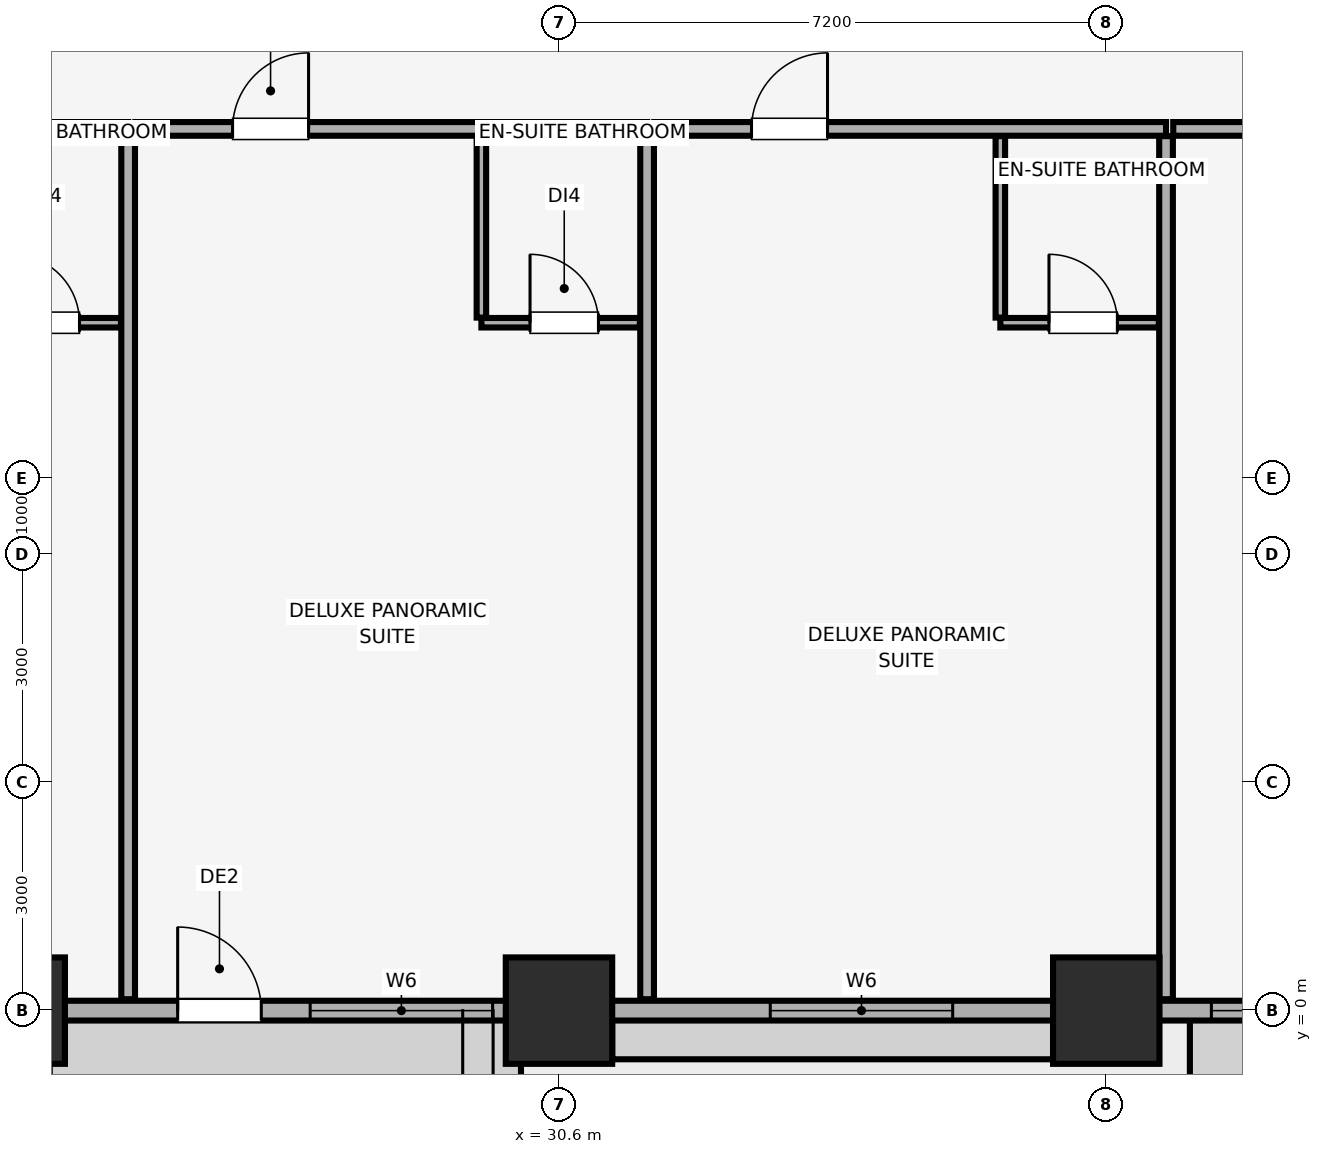
"""IFC4 building model, lengths in metres.
Left out: names, types, materials, properties, quantities, classifications, styles, units other than length and angle.
Written with IfcOpenShell. Run it as: python <this file> out.ifc"""

import sys

from ifc_helpers import new_model, si_unit, direction, frame, frame_2d, origin, origin_2d, place, context, subcontext, project, spatial, rectangle, extrude, element, fill, save


model = new_model("IFC4")
c1 = context("Model", 3, precision=1e-05, world=origin(), true_north=direction((0.0, 1.0)))
c2 = subcontext(c1, "Body", "Model", "MODEL_VIEW")
j1 = project(units=[si_unit("LENGTHUNIT", "METRE"), si_unit("PLANEANGLEUNIT", "RADIAN")], contexts=[c1])
p1 = place(None, origin())
s1 = spatial("IfcSite", under=j1, at=p1, CompositionType="ELEMENT")
p2 = place(p1, origin())
s2 = spatial("IfcBuilding", under=s1, at=p2, CompositionType="ELEMENT")
p3 = place(p2, frame((0.0, 0.0, 57.65)))
s3 = spatial("IfcBuildingStorey", under=s2, at=p3, CompositionType="ELEMENT", Elevation=57.65)
for number, where, z_axis, x_axis in (
    (1, (23.4, 0.0, 0.0), (0.0, 0.0, 1.0), (1.0, 0.0, 0.0)),
    (2, (30.6, 0.0, 0.0), (0.0, 0.0, 1.0), (1.0, 0.0, 0.0)),
    (3, (37.8, 0.0, 0.0), (0.0, 0.0, 1.0), (1.0, 0.0, 0.0)),
):
    element("IfcColumn", number, at=place(p3, frame(where, z_axis=z_axis, x_axis=x_axis)), inside=s3, PredefinedType="COLUMN", context=c2, shape_type="SweptSolid", body=[
        extrude(rectangle(XDim=1.4, YDim=1.4, at=origin_2d()), origin(), (0.0, 0.0, 1.0), 3.51),
    ])
p4 = place(p3, frame((4.2, 0.0, 0.0), z_axis=(0.0, 0.0, 1.0), x_axis=(1.0, 0.0, 0.0)))
e4 = element("IfcWall", 4, at=p4, inside=s3, PredefinedType="SOLIDWALL", context=c2, shape_type="SweptSolid", body=[
    extrude(rectangle(XDim=75.6, YDim=0.26, at=frame_2d((37.8, 0.0))), origin(), (0.0, 0.0, 1.0), 2.56),
])
p5 = place(p4, frame((21.383, 0.0, 0.0)))
e5 = element("IfcOpeningElement", 5, at=p5, cuts=e4, PredefinedType="OPENING", context=c2, shape_type="SweptSolid", body=[
    extrude(rectangle(XDim=1.1, YDim=2.15, at=frame_2d((0.55, 1.075))), frame((0.0, 0.14, 0.0), z_axis=(0.0, -1.0, 0.0), x_axis=(1.0, 0.0, 0.0)), (0.0, 0.0, 1.0), 0.28),
])
p6 = place(p4, frame((37.25, 0.0, 0.0)))
e6 = element("IfcOpeningElement", 6, at=p6, cuts=e4, PredefinedType="OPENING", context=c2, shape_type="SweptSolid", body=[
    extrude(rectangle(XDim=1.1, YDim=2.15, at=frame_2d((0.55, 1.075))), frame((0.0, 0.14, 0.0), z_axis=(0.0, -1.0, 0.0), x_axis=(1.0, 0.0, 0.0)), (0.0, 0.0, 1.0), 0.28),
])
p7 = place(p4, frame((53.117, 0.0, 0.0)))
e7 = element("IfcOpeningElement", 7, at=p7, cuts=e4, PredefinedType="OPENING", context=c2, shape_type="SweptSolid", body=[
    extrude(rectangle(XDim=1.1, YDim=2.15, at=frame_2d((0.55, 1.075))), frame((0.0, 0.14, 0.0), z_axis=(0.0, -1.0, 0.0), x_axis=(1.0, 0.0, 0.0)), (0.0, 0.0, 1.0), 0.28),
])
p8 = place(p4, frame((1.035, 0.0, 0.85)))
e8 = element("IfcOpeningElement", 8, at=p8, cuts=e4, PredefinedType="OPENING", context=c2, shape_type="SweptSolid", body=[
    extrude(rectangle(XDim=2.4, YDim=1.5, at=frame_2d((1.2, 0.75))), frame((0.0, 0.14, 0.0), z_axis=(0.0, -1.0, 0.0), x_axis=(1.0, 0.0, 0.0)), (0.0, 0.0, 1.0), 0.28),
])
p9 = place(p4, frame((8.138, 0.0, 0.85)))
e9 = element("IfcOpeningElement", 9, at=p9, cuts=e4, PredefinedType="OPENING", context=c2, shape_type="SweptSolid", body=[
    extrude(rectangle(XDim=2.4, YDim=1.5, at=frame_2d((1.2, 0.75))), frame((0.0, 0.14, 0.0), z_axis=(0.0, -1.0, 0.0), x_axis=(1.0, 0.0, 0.0)), (0.0, 0.0, 1.0), 0.28),
])
p10 = place(p4, frame((15.153, 0.0, 0.85)))
e10 = element("IfcOpeningElement", 10, at=p10, cuts=e4, PredefinedType="OPENING", context=c2, shape_type="SweptSolid", body=[
    extrude(rectangle(XDim=2.4, YDim=1.5, at=frame_2d((1.2, 0.75))), frame((0.0, 0.14, 0.0), z_axis=(0.0, -1.0, 0.0), x_axis=(1.0, 0.0, 0.0)), (0.0, 0.0, 1.0), 0.28),
])
p11 = place(p4, frame((23.127, 0.0, 0.85)))
e11 = element("IfcOpeningElement", 11, at=p11, cuts=e4, PredefinedType="OPENING", context=c2, shape_type="SweptSolid", body=[
    extrude(rectangle(XDim=2.4, YDim=1.5, at=frame_2d((1.2, 0.75))), frame((0.0, 0.14, 0.0), z_axis=(0.0, -1.0, 0.0), x_axis=(1.0, 0.0, 0.0)), (0.0, 0.0, 1.0), 0.28),
])
p12 = place(p4, frame((29.179, 0.0, 0.85)))
e12 = element("IfcOpeningElement", 12, at=p12, cuts=e4, PredefinedType="OPENING", context=c2, shape_type="SweptSolid", body=[
    extrude(rectangle(XDim=2.4, YDim=1.5, at=frame_2d((1.2, 0.75))), frame((0.0, 0.14, 0.0), z_axis=(0.0, -1.0, 0.0), x_axis=(1.0, 0.0, 0.0)), (0.0, 0.0, 1.0), 0.28),
])
p13 = place(p4, frame((34.983, 0.0, 0.85)))
e13 = element("IfcOpeningElement", 13, at=p13, cuts=e4, PredefinedType="OPENING", context=c2, shape_type="SweptSolid", body=[
    extrude(rectangle(XDim=1.5, YDim=1.4, at=frame_2d((0.75, 0.7))), frame((0.0, 0.14, 0.0), z_axis=(0.0, -1.0, 0.0), x_axis=(1.0, 0.0, 0.0)), (0.0, 0.0, 1.0), 0.28),
])
p14 = place(p4, frame((39.117, 0.0, 0.85)))
e14 = element("IfcOpeningElement", 14, at=p14, cuts=e4, PredefinedType="OPENING", context=c2, shape_type="SweptSolid", body=[
    extrude(rectangle(XDim=1.5, YDim=1.4, at=frame_2d((0.75, 0.7))), frame((0.0, 0.14, 0.0), z_axis=(0.0, -1.0, 0.0), x_axis=(1.0, 0.0, 0.0)), (0.0, 0.0, 1.0), 0.28),
])
p15 = place(p4, frame((44.021, 0.0, 0.85)))
e15 = element("IfcOpeningElement", 15, at=p15, cuts=e4, PredefinedType="OPENING", context=c2, shape_type="SweptSolid", body=[
    extrude(rectangle(XDim=2.4, YDim=1.5, at=frame_2d((1.2, 0.75))), frame((0.0, 0.14, 0.0), z_axis=(0.0, -1.0, 0.0), x_axis=(1.0, 0.0, 0.0)), (0.0, 0.0, 1.0), 0.28),
])
p16 = place(p4, frame((50.073, 0.0, 0.85)))
e16 = element("IfcOpeningElement", 16, at=p16, cuts=e4, PredefinedType="OPENING", context=c2, shape_type="SweptSolid", body=[
    extrude(rectangle(XDim=2.4, YDim=1.5, at=frame_2d((1.2, 0.75))), frame((0.0, 0.14, 0.0), z_axis=(0.0, -1.0, 0.0), x_axis=(1.0, 0.0, 0.0)), (0.0, 0.0, 1.0), 0.28),
])
p17 = place(p4, frame((58.048, 0.0, 0.85)))
e17 = element("IfcOpeningElement", 17, at=p17, cuts=e4, PredefinedType="OPENING", context=c2, shape_type="SweptSolid", body=[
    extrude(rectangle(XDim=2.4, YDim=1.5, at=frame_2d((1.2, 0.75))), frame((0.0, 0.14, 0.0), z_axis=(0.0, -1.0, 0.0), x_axis=(1.0, 0.0, 0.0)), (0.0, 0.0, 1.0), 0.28),
])
p18 = place(p4, frame((65.062, 0.0, 0.85)))
e18 = element("IfcOpeningElement", 18, at=p18, cuts=e4, PredefinedType="OPENING", context=c2, shape_type="SweptSolid", body=[
    extrude(rectangle(XDim=2.4, YDim=1.5, at=frame_2d((1.2, 0.75))), frame((0.0, 0.14, 0.0), z_axis=(0.0, -1.0, 0.0), x_axis=(1.0, 0.0, 0.0)), (0.0, 0.0, 1.0), 0.28),
])
p19 = place(p4, frame((72.165, 0.0, 0.85)))
e19 = element("IfcOpeningElement", 19, at=p19, cuts=e4, PredefinedType="OPENING", context=c2, shape_type="SweptSolid", body=[
    extrude(rectangle(XDim=2.4, YDim=1.5, at=frame_2d((1.2, 0.75))), frame((0.0, 0.14, 0.0), z_axis=(0.0, -1.0, 0.0), x_axis=(1.0, 0.0, 0.0)), (0.0, 0.0, 1.0), 0.28),
])
p20 = place(p3, frame((18.199, 11.6, 0.0), z_axis=(0.0, 0.0, 1.0), x_axis=(1.0, 0.0, 0.0)))
e20 = element("IfcWall", 20, at=p20, inside=s3, PredefinedType="PARTITIONING", context=c2, shape_type="SweptSolid", body=[
    extrude(rectangle(XDim=6.732, YDim=0.18, at=frame_2d((3.366, 0.0))), origin(), (0.0, 0.0, 1.0), 3.51),
])
p21 = place(p20, frame((1.279, 0.0, 0.0)))
e21 = element("IfcOpeningElement", 21, at=p21, cuts=e20, PredefinedType="OPENING", context=c2, shape_type="SweptSolid", body=[
    extrude(rectangle(XDim=1.0, YDim=2.15, at=frame_2d((0.5, 1.075))), frame((0.0, 0.1, 0.0), z_axis=(0.0, -1.0, 0.0), x_axis=(1.0, 0.0, 0.0)), (0.0, 0.0, 1.0), 0.2),
])
p22 = place(p3, frame((24.932, 0.15, 0.0), z_axis=(0.0, 0.0, 1.0), x_axis=(0.0, 1.0, 0.0)))
e22 = element("IfcWall", 22, at=p22, inside=s3, PredefinedType="PARTITIONING", context=c2, shape_type="SweptSolid", body=[
    extrude(rectangle(XDim=11.355, YDim=0.18, at=frame_2d((5.677, 0.0))), origin(), (0.0, 0.0, 1.0), 3.51),
])
p23 = place(p3, frame((22.752, 9.05, 0.0), z_axis=(0.0, 0.0, 1.0), x_axis=(1.0, 0.0, 0.0)))
e23 = element("IfcWall", 23, at=p23, inside=s3, PredefinedType="PARTITIONING", context=c2, shape_type="SweptSolid", body=[
    extrude(rectangle(XDim=2.085, YDim=0.125, at=frame_2d((1.042, 0.0))), origin(), (0.0, 0.0, 1.0), 3.51),
])
p24 = place(p23, frame((0.64, 0.0, 0.0)))
e24 = element("IfcOpeningElement", 24, at=p24, cuts=e23, PredefinedType="OPENING", context=c2, shape_type="SweptSolid", body=[
    extrude(rectangle(XDim=0.9, YDim=2.1, at=frame_2d((0.45, 1.05))), frame((0.0, 0.073, 0.0), z_axis=(0.0, -1.0, 0.0), x_axis=(1.0, 0.0, 0.0)), (0.0, 0.0, 1.0), 0.145),
])
p25 = place(p3, frame((25.027, 11.6, 0.0), z_axis=(0.0, 0.0, 1.0), x_axis=(1.0, 0.0, 0.0)))
e25 = element("IfcWall", 25, at=p25, inside=s3, PredefinedType="PARTITIONING", context=c2, shape_type="SweptSolid", body=[
    extrude(rectangle(XDim=6.732, YDim=0.18, at=frame_2d((3.366, 0.0))), origin(), (0.0, 0.0, 1.0), 3.51),
])
p26 = place(p25, frame((1.279, 0.0, 0.0)))
e26 = element("IfcOpeningElement", 26, at=p26, cuts=e25, PredefinedType="OPENING", context=c2, shape_type="SweptSolid", body=[
    extrude(rectangle(XDim=1.0, YDim=2.15, at=frame_2d((0.5, 1.075))), frame((0.0, 0.1, 0.0), z_axis=(0.0, -1.0, 0.0), x_axis=(1.0, 0.0, 0.0)), (0.0, 0.0, 1.0), 0.2),
])
p27 = place(p3, frame((31.759, 0.15, 0.0), z_axis=(0.0, 0.0, 1.0), x_axis=(0.0, 1.0, 0.0)))
e27 = element("IfcWall", 27, at=p27, inside=s3, PredefinedType="PARTITIONING", context=c2, shape_type="SweptSolid", body=[
    extrude(rectangle(XDim=11.355, YDim=0.18, at=frame_2d((5.677, 0.0))), origin(), (0.0, 0.0, 1.0), 3.51),
])
p28 = place(p3, frame((29.579, 9.05, 0.0), z_axis=(0.0, 0.0, 1.0), x_axis=(1.0, 0.0, 0.0)))
e28 = element("IfcWall", 28, at=p28, inside=s3, PredefinedType="PARTITIONING", context=c2, shape_type="SweptSolid", body=[
    extrude(rectangle(XDim=2.085, YDim=0.125, at=frame_2d((1.042, 0.0))), origin(), (0.0, 0.0, 1.0), 3.51),
])
p29 = place(p28, frame((0.64, 0.0, 0.0)))
e29 = element("IfcOpeningElement", 29, at=p29, cuts=e28, PredefinedType="OPENING", context=c2, shape_type="SweptSolid", body=[
    extrude(rectangle(XDim=0.9, YDim=2.1, at=frame_2d((0.45, 1.05))), frame((0.0, 0.073, 0.0), z_axis=(0.0, -1.0, 0.0), x_axis=(1.0, 0.0, 0.0)), (0.0, 0.0, 1.0), 0.145),
])
p30 = place(p3, frame((29.579, 9.117, 0.0), z_axis=(0.0, 0.0, 1.0), x_axis=(0.0, 1.0, 0.0)))
e30 = element("IfcWall", 30, at=p30, inside=s3, PredefinedType="PARTITIONING", context=c2, shape_type="SweptSolid", body=[
    extrude(rectangle(XDim=2.387, YDim=0.125, at=frame_2d((1.194, 0.0))), origin(), (0.0, 0.0, 1.0), 3.51),
])
p31 = place(p3, frame((31.854, 11.6, 0.0), z_axis=(0.0, 0.0, 1.0), x_axis=(1.0, 0.0, 0.0)))
e31 = element("IfcWall", 31, at=p31, inside=s3, PredefinedType="PARTITIONING", context=c2, shape_type="SweptSolid", body=[
    extrude(rectangle(XDim=6.732, YDim=0.18, at=frame_2d((3.366, 0.0))), origin(), (0.0, 0.0, 1.0), 3.51),
])
p32 = place(p31, frame((1.279, 0.0, 0.0)))
e32 = element("IfcOpeningElement", 32, at=p32, cuts=e31, PredefinedType="OPENING", context=c2, shape_type="SweptSolid", body=[
    extrude(rectangle(XDim=1.0, YDim=2.15, at=frame_2d((0.5, 1.075))), frame((0.0, 0.1, 0.0), z_axis=(0.0, -1.0, 0.0), x_axis=(1.0, 0.0, 0.0)), (0.0, 0.0, 1.0), 0.2),
])
p33 = place(p3, frame((38.586, 0.15, 0.0), z_axis=(0.0, 0.0, 1.0), x_axis=(0.0, 1.0, 0.0)))
e33 = element("IfcWall", 33, at=p33, inside=s3, PredefinedType="PARTITIONING", context=c2, shape_type="SweptSolid", body=[
    extrude(rectangle(XDim=11.355, YDim=0.18, at=frame_2d((5.677, 0.0))), origin(), (0.0, 0.0, 1.0), 3.51),
])
p34 = place(p3, frame((36.406, 9.05, 0.0), z_axis=(0.0, 0.0, 1.0), x_axis=(1.0, 0.0, 0.0)))
e34 = element("IfcWall", 34, at=p34, inside=s3, PredefinedType="PARTITIONING", context=c2, shape_type="SweptSolid", body=[
    extrude(rectangle(XDim=2.085, YDim=0.125, at=frame_2d((1.042, 0.0))), origin(), (0.0, 0.0, 1.0), 3.51),
])
p35 = place(p34, frame((0.64, 0.0, 0.0)))
e35 = element("IfcOpeningElement", 35, at=p35, cuts=e34, PredefinedType="OPENING", context=c2, shape_type="SweptSolid", body=[
    extrude(rectangle(XDim=0.9, YDim=2.1, at=frame_2d((0.45, 1.05))), frame((0.0, 0.073, 0.0), z_axis=(0.0, -1.0, 0.0), x_axis=(1.0, 0.0, 0.0)), (0.0, 0.0, 1.0), 0.145),
])
p36 = place(p3, frame((36.406, 9.117, 0.0), z_axis=(0.0, 0.0, 1.0), x_axis=(0.0, 1.0, 0.0)))
e36 = element("IfcWall", 36, at=p36, inside=s3, PredefinedType="PARTITIONING", context=c2, shape_type="SweptSolid", body=[
    extrude(rectangle(XDim=2.387, YDim=0.125, at=frame_2d((1.194, 0.0))), origin(), (0.0, 0.0, 1.0), 3.51),
])
p37 = place(p3, frame((38.681, 11.6, 0.0), z_axis=(0.0, 0.0, 1.0), x_axis=(1.0, 0.0, 0.0)))
e37 = element("IfcWall", 37, at=p37, inside=s3, PredefinedType="PARTITIONING", context=c2, shape_type="SweptSolid", body=[
    extrude(rectangle(XDim=6.732, YDim=0.18, at=frame_2d((3.366, 0.0))), origin(), (0.0, 0.0, 1.0), 3.51),
])
p38 = place(p37, frame((1.279, 0.0, 0.0)))
e38 = element("IfcOpeningElement", 38, at=p38, cuts=e37, PredefinedType="OPENING", context=c2, shape_type="SweptSolid", body=[
    extrude(rectangle(XDim=1.0, YDim=2.15, at=frame_2d((0.5, 1.075))), frame((0.0, 0.1, 0.0), z_axis=(0.0, -1.0, 0.0), x_axis=(1.0, 0.0, 0.0)), (0.0, 0.0, 1.0), 0.2),
])
p39 = place(p5, origin())
e39 = element("IfcDoor", 39, at=p39, inside=s3, OperationType="SINGLE_SWING_LEFT", PredefinedType="DOOR", context=c2, shape_type="SweptSolid", body=[
    extrude(rectangle(XDim=1.1, YDim=2.15, at=frame_2d((0.55, 1.075))), frame((0.0, 0.025, 0.0), z_axis=(0.0, -1.0, 0.0), x_axis=(1.0, 0.0, 0.0)), (0.0, 0.0, 1.0), 0.05),
])
fill(e5, e39)
p40 = place(p11, origin())
e40 = element("IfcWindow", 40, at=p40, inside=s3, PartitioningType="SINGLE_PANEL", PredefinedType="WINDOW", context=c2, shape_type="SweptSolid", body=[
    extrude(rectangle(XDim=2.4, YDim=1.5, at=frame_2d((1.2, 0.75))), frame((0.0, 0.03, 0.0), z_axis=(0.0, -1.0, 0.0), x_axis=(1.0, 0.0, 0.0)), (0.0, 0.0, 1.0), 0.06),
])
fill(e11, e40)
p41 = place(p12, origin())
e41 = element("IfcWindow", 41, at=p41, inside=s3, PartitioningType="SINGLE_PANEL", PredefinedType="WINDOW", context=c2, shape_type="SweptSolid", body=[
    extrude(rectangle(XDim=2.4, YDim=1.5, at=frame_2d((1.2, 0.75))), frame((0.0, 0.03, 0.0), z_axis=(0.0, -1.0, 0.0), x_axis=(1.0, 0.0, 0.0)), (0.0, 0.0, 1.0), 0.06),
])
fill(e12, e41)
p42 = place(p13, origin())
e42 = element("IfcWindow", 42, at=p42, inside=s3, PartitioningType="SINGLE_PANEL", PredefinedType="WINDOW", context=c2, shape_type="SweptSolid", body=[
    extrude(rectangle(XDim=1.5, YDim=1.4, at=frame_2d((0.75, 0.7))), frame((0.0, 0.03, 0.0), z_axis=(0.0, -1.0, 0.0), x_axis=(1.0, 0.0, 0.0)), (0.0, 0.0, 1.0), 0.06),
])
fill(e13, e42)
p43 = place(p24, origin())
e43 = element("IfcDoor", 43, at=p43, inside=s3, OperationType="SINGLE_SWING_LEFT", PredefinedType="DOOR", context=c2, shape_type="SweptSolid", body=[
    extrude(rectangle(XDim=0.9, YDim=2.1, at=frame_2d((0.45, 1.05))), frame((0.0, 0.025, 0.0), z_axis=(0.0, -1.0, 0.0), x_axis=(1.0, 0.0, 0.0)), (0.0, 0.0, 1.0), 0.05),
])
fill(e24, e43)
p44 = place(p26, origin())
e44 = element("IfcDoor", 44, at=p44, inside=s3, OperationType="SINGLE_SWING_RIGHT", PredefinedType="DOOR", context=c2, shape_type="SweptSolid", body=[
    extrude(rectangle(XDim=1.0, YDim=2.15, at=frame_2d((0.5, 1.075))), frame((0.0, 0.025, 0.0), z_axis=(0.0, -1.0, 0.0), x_axis=(1.0, 0.0, 0.0)), (0.0, 0.0, 1.0), 0.05),
])
fill(e26, e44)
p45 = place(p29, origin())
e45 = element("IfcDoor", 45, at=p45, inside=s3, OperationType="SINGLE_SWING_LEFT", PredefinedType="DOOR", context=c2, shape_type="SweptSolid", body=[
    extrude(rectangle(XDim=0.9, YDim=2.1, at=frame_2d((0.45, 1.05))), frame((0.0, 0.025, 0.0), z_axis=(0.0, -1.0, 0.0), x_axis=(1.0, 0.0, 0.0)), (0.0, 0.0, 1.0), 0.05),
])
fill(e29, e45)
p46 = place(p32, origin())
e46 = element("IfcDoor", 46, at=p46, inside=s3, OperationType="SINGLE_SWING_RIGHT", PredefinedType="DOOR", context=c2, shape_type="SweptSolid", body=[
    extrude(rectangle(XDim=1.0, YDim=2.15, at=frame_2d((0.5, 1.075))), frame((0.0, 0.025, 0.0), z_axis=(0.0, -1.0, 0.0), x_axis=(1.0, 0.0, 0.0)), (0.0, 0.0, 1.0), 0.05),
])
fill(e32, e46)
p47 = place(p35, origin())
e47 = element("IfcDoor", 47, at=p47, inside=s3, OperationType="SINGLE_SWING_LEFT", PredefinedType="DOOR", context=c2, shape_type="SweptSolid", body=[
    extrude(rectangle(XDim=0.9, YDim=2.1, at=frame_2d((0.45, 1.05))), frame((0.0, 0.025, 0.0), z_axis=(0.0, -1.0, 0.0), x_axis=(1.0, 0.0, 0.0)), (0.0, 0.0, 1.0), 0.05),
])
fill(e35, e47)
save(model, sys.argv[1])
